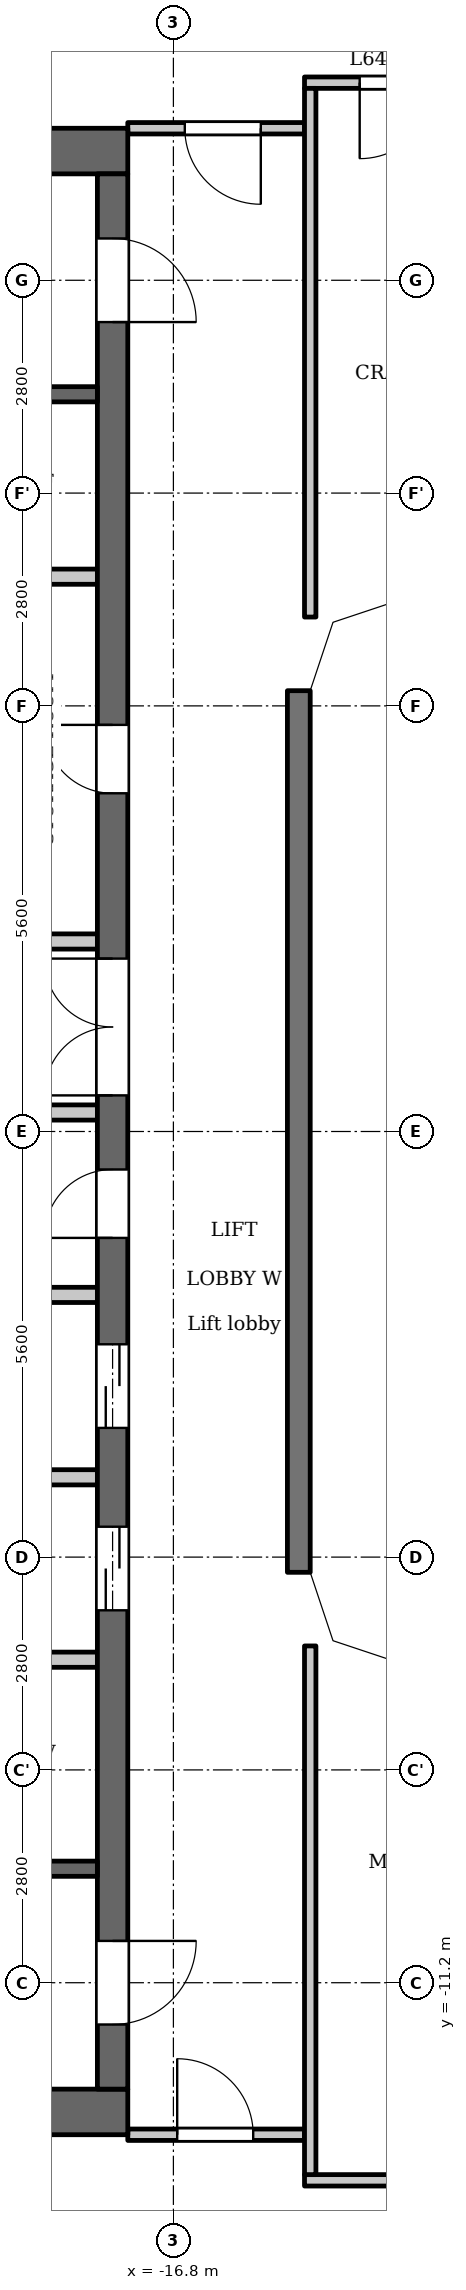
"""IFC4 building model, lengths in metres.
Left out: names, types, materials, properties, quantities, classifications, styles, units other than length and angle.
Written with IfcOpenShell. Run it as: python <this file> out.ifc"""

import sys

from ifc_helpers import new_model, si_unit, direction, frame, frame_2d, origin, place, context, subcontext, project, spatial, polyline, rectangle, outline, extrude, element, fill, save


model = new_model("IFC4")
c1 = context("Model", 3, precision=1e-05, world=origin(), true_north=direction((0.0, 1.0)))
c2 = subcontext(c1, "Body", "Model", "MODEL_VIEW")
j1 = project(units=[si_unit("LENGTHUNIT", "METRE"), si_unit("PLANEANGLEUNIT", "RADIAN")], contexts=[c1])
p1 = place(None, origin())
s1 = spatial("IfcSite", under=j1, at=p1, CompositionType="ELEMENT")
p2 = place(p1, origin())
s2 = spatial("IfcBuilding", under=s1, at=p2, CompositionType="ELEMENT")
p3 = place(p2, frame((0.0, 0.0, 248.7)))
s3 = spatial("IfcBuildingStorey", under=s2, at=p3, CompositionType="ELEMENT", Elevation=248.7)
p4 = place(p3, frame((-15.15, -5.8, 0.0), z_axis=(0.0, 0.0, 1.0), x_axis=(0.0, 1.0, 0.0)))
e1 = element("IfcWall", 1, at=p4, inside=s3, PredefinedType="SOLIDWALL", context=c2, shape_type="SweptSolid", body=[
    extrude(rectangle(XDim=11.6, YDim=0.3, at=frame_2d((5.8, 0.0))), origin(), (0.0, 0.0, 1.0), 3.2),
])
for number, where, z_axis, x_axis in (
    (2, (-17.4, 12.9, 0.0), (0.0, 0.0, 1.0), (-1.0, 0.0, 0.0)),
    (3, (-17.4, -12.9, 0.0), (0.0, 0.0, 1.0), (-1.0, 0.0, 0.0)),
):
    element("IfcWall", number, at=place(p3, frame(where, z_axis=z_axis, x_axis=x_axis)), inside=s3, PredefinedType="SHEAR", context=c2, shape_type="SweptSolid", body=[
        extrude(rectangle(XDim=7.32, YDim=0.6, at=frame_2d((3.66, 0.0))), origin(), (0.0, 0.0, 1.0), 3.2),
    ])
p5 = place(p3, frame((-17.6, -12.6, 0.0), z_axis=(0.0, 0.0, 1.0), x_axis=(0.0, 1.0, 0.0)))
e4 = element("IfcWall", 4, at=p5, inside=s3, PredefinedType="SHEAR", context=c2, shape_type="SweptSolid", body=[
    extrude(rectangle(XDim=25.2, YDim=0.4, at=frame_2d((12.6, 0.0))), origin(), (0.0, 0.0, 1.0), 3.2),
])
p6 = place(p5, frame((6.3, 0.0, 0.0)))
e5 = element("IfcOpeningElement", 5, at=p6, cuts=e4, PredefinedType="OPENING", context=c2, shape_type="SweptSolid", body=[
    extrude(rectangle(XDim=1.1, YDim=2.1, at=frame_2d((0.55, 1.05))), frame((0.0, 0.21, 0.0), z_axis=(0.0, -1.0, 0.0), x_axis=(1.0, 0.0, 0.0)), (0.0, 0.0, 1.0), 0.42),
])
p7 = place(p5, frame((8.7, 0.0, 0.0)))
e6 = element("IfcOpeningElement", 6, at=p7, cuts=e4, PredefinedType="OPENING", context=c2, shape_type="SweptSolid", body=[
    extrude(rectangle(XDim=1.1, YDim=2.1, at=frame_2d((0.55, 1.05))), frame((0.0, 0.21, 0.0), z_axis=(0.0, -1.0, 0.0), x_axis=(1.0, 0.0, 0.0)), (0.0, 0.0, 1.0), 0.42),
])
p8 = place(p5, frame((11.2, 0.0, 0.0)))
e7 = element("IfcOpeningElement", 7, at=p8, cuts=e4, PredefinedType="OPENING", context=c2, shape_type="SweptSolid", body=[
    extrude(rectangle(XDim=0.9, YDim=2.1, at=frame_2d((0.45, 1.05))), frame((0.0, 0.21, 0.0), z_axis=(0.0, -1.0, 0.0), x_axis=(1.0, 0.0, 0.0)), (0.0, 0.0, 1.0), 0.42),
])
p9 = place(p5, frame((17.05, 0.0, 0.0)))
e8 = element("IfcOpeningElement", 8, at=p9, cuts=e4, PredefinedType="OPENING", context=c2, shape_type="SweptSolid", body=[
    extrude(rectangle(XDim=0.9, YDim=2.1, at=frame_2d((0.45, 1.05))), frame((0.0, 0.21, 0.0), z_axis=(0.0, -1.0, 0.0), x_axis=(1.0, 0.0, 0.0)), (0.0, 0.0, 1.0), 0.42),
])
p10 = place(p5, frame((23.25, 0.0, 0.0)))
e9 = element("IfcOpeningElement", 9, at=p10, cuts=e4, PredefinedType="OPENING", context=c2, shape_type="SweptSolid", body=[
    extrude(rectangle(XDim=1.1, YDim=2.1, at=frame_2d((0.55, 1.05))), frame((0.0, 0.21, 0.0), z_axis=(0.0, -1.0, 0.0), x_axis=(1.0, 0.0, 0.0)), (0.0, 0.0, 1.0), 0.42),
])
p11 = place(p5, frame((0.85, 0.0, 0.0)))
e10 = element("IfcOpeningElement", 10, at=p11, cuts=e4, PredefinedType="OPENING", context=c2, shape_type="SweptSolid", body=[
    extrude(rectangle(XDim=1.1, YDim=2.1, at=frame_2d((0.55, 1.05))), frame((0.0, 0.21, 0.0), z_axis=(0.0, -1.0, 0.0), x_axis=(1.0, 0.0, 0.0)), (0.0, 0.0, 1.0), 0.42),
])
p12 = place(p5, frame((13.075, 0.0, 0.0)))
e11 = element("IfcOpeningElement", 11, at=p12, cuts=e4, PredefinedType="OPENING", context=c2, shape_type="SweptSolid", body=[
    extrude(rectangle(XDim=1.8, YDim=2.1, at=frame_2d((0.9, 1.05))), frame((0.0, 0.21, 0.0), z_axis=(0.0, -1.0, 0.0), x_axis=(1.0, 0.0, 0.0)), (0.0, 0.0, 1.0), 0.42),
])
p13 = place(p3, frame((-17.8, -9.7, 0.0), z_axis=(0.0, 0.0, 1.0), x_axis=(-1.0, 0.0, 0.0)))
e12 = element("IfcWall", 12, at=p13, inside=s3, PredefinedType="SHEAR", context=c2, shape_type="SweptSolid", body=[
    extrude(rectangle(XDim=5.8, YDim=0.2, at=frame_2d((2.9, 0.0))), origin(), (0.0, 0.0, 1.0), 3.2),
])
p14 = place(p13, frame((0.85, 0.0, 0.0)))
e13 = element("IfcOpeningElement", 13, at=p14, cuts=e12, PredefinedType="OPENING", context=c2, shape_type="SweptSolid", body=[
    extrude(rectangle(XDim=1.1, YDim=2.1, at=frame_2d((0.55, 1.05))), frame((0.0, 0.11, 0.0), z_axis=(0.0, -1.0, 0.0), x_axis=(1.0, 0.0, 0.0)), (0.0, 0.0, 1.0), 0.22),
])
p15 = place(p13, frame((3.75, 0.0, 0.0)))
e14 = element("IfcOpeningElement", 14, at=p15, cuts=e12, PredefinedType="OPENING", context=c2, shape_type="SweptSolid", body=[
    extrude(rectangle(XDim=1.1, YDim=2.1, at=frame_2d((0.55, 1.05))), frame((0.0, 0.11, 0.0), z_axis=(0.0, -1.0, 0.0), x_axis=(1.0, 0.0, 0.0)), (0.0, 0.0, 1.0), 0.22),
])
for number, where, z_axis, x_axis in (
    (15, (-17.8, -6.95, 0.0), (0.0, 0.0, 1.0), (-1.0, 0.0, 0.0)),
    (16, (-17.8, -4.55, 0.0), (0.0, 0.0, 1.0), (-1.0, 0.0, 0.0)),
    (17, (-17.8, -2.15, 0.0), (0.0, 0.0, 1.0), (-1.0, 0.0, 0.0)),
):
    element("IfcWall", number, at=place(p3, frame(where, z_axis=z_axis, x_axis=x_axis)), inside=s3, PredefinedType="PARTITIONING", context=c2, shape_type="SweptSolid", body=[
        extrude(rectangle(XDim=2.8, YDim=0.2, at=frame_2d((1.4, 0.0))), origin(), (0.0, 0.0, 1.0), 3.2),
    ])
p16 = place(p3, frame((-17.8, 0.25, 0.0), z_axis=(0.0, 0.0, 1.0), x_axis=(-1.0, 0.0, 0.0)))
e18 = element("IfcWall", 18, at=p16, inside=s3, PredefinedType="PARTITIONING", context=c2, shape_type="SweptSolid", body=[
    extrude(rectangle(XDim=3.0, YDim=0.2, at=frame_2d((1.5, 0.0))), origin(), (0.0, 0.0, 1.0), 3.2),
])
p17 = place(p3, frame((-17.8, 2.5, 0.0), z_axis=(0.0, 0.0, 1.0), x_axis=(-1.0, 0.0, 0.0)))
e19 = element("IfcWall", 19, at=p17, inside=s3, PredefinedType="PARTITIONING", context=c2, shape_type="SweptSolid", body=[
    extrude(rectangle(XDim=3.0, YDim=0.2, at=frame_2d((1.5, 0.0))), origin(), (0.0, 0.0, 1.0), 3.2),
])
p18 = place(p17, frame((1.7, 0.0, 0.0)))
e20 = element("IfcOpeningElement", 20, at=p18, cuts=e19, PredefinedType="OPENING", context=c2, shape_type="SweptSolid", body=[
    extrude(rectangle(XDim=0.9, YDim=2.1, at=frame_2d((0.45, 1.05))), frame((0.0, 0.11, 0.0), z_axis=(0.0, -1.0, 0.0), x_axis=(1.0, 0.0, 0.0)), (0.0, 0.0, 1.0), 0.22),
])
p19 = place(p3, frame((-17.8, 7.3, 0.0), z_axis=(0.0, 0.0, 1.0), x_axis=(-1.0, 0.0, 0.0)))
e21 = element("IfcWall", 21, at=p19, inside=s3, PredefinedType="PARTITIONING", context=c2, shape_type="SweptSolid", body=[
    extrude(rectangle(XDim=2.8, YDim=0.2, at=frame_2d((1.4, 0.0))), origin(), (0.0, 0.0, 1.0), 3.2),
])
p20 = place(p3, frame((-17.8, 9.7, 0.0), z_axis=(0.0, 0.0, 1.0), x_axis=(-1.0, 0.0, 0.0)))
e22 = element("IfcWall", 22, at=p20, inside=s3, PredefinedType="SHEAR", context=c2, shape_type="SweptSolid", body=[
    extrude(rectangle(XDim=5.8, YDim=0.2, at=frame_2d((2.9, 0.0))), origin(), (0.0, 0.0, 1.0), 3.2),
])
p21 = place(p20, frame((0.85, 0.0, 0.0)))
e23 = element("IfcOpeningElement", 23, at=p21, cuts=e22, PredefinedType="OPENING", context=c2, shape_type="SweptSolid", body=[
    extrude(rectangle(XDim=1.1, YDim=2.1, at=frame_2d((0.55, 1.05))), frame((0.0, 0.11, 0.0), z_axis=(0.0, -1.0, 0.0), x_axis=(1.0, 0.0, 0.0)), (0.0, 0.0, 1.0), 0.22),
])
p22 = place(p20, frame((3.75, 0.0, 0.0)))
e24 = element("IfcOpeningElement", 24, at=p22, cuts=e22, PredefinedType="OPENING", context=c2, shape_type="SweptSolid", body=[
    extrude(rectangle(XDim=1.1, YDim=2.1, at=frame_2d((0.55, 1.05))), frame((0.0, 0.11, 0.0), z_axis=(0.0, -1.0, 0.0), x_axis=(1.0, 0.0, 0.0)), (0.0, 0.0, 1.0), 0.22),
])
p23 = place(p3, frame((-15.075, -13.8, 0.0), z_axis=(0.0, 0.0, 1.0), x_axis=(1.0, 0.0, 0.0)))
e25 = element("IfcWall", 25, at=p23, inside=s3, PredefinedType="PARTITIONING", context=c2, shape_type="SweptSolid", body=[
    extrude(rectangle(XDim=30.15, YDim=0.15, at=frame_2d((15.075, 0.0))), origin(), (0.0, 0.0, 1.0), 3.2),
])
p24 = place(p23, frame((2.225, 0.0, 0.0)))
e26 = element("IfcOpeningElement", 26, at=p24, cuts=e25, PredefinedType="OPENING", context=c2, shape_type="SweptSolid", body=[
    extrude(rectangle(XDim=1.0, YDim=2.1, at=frame_2d((0.5, 1.05))), frame((0.0, 0.085, 0.0), z_axis=(0.0, -1.0, 0.0), x_axis=(1.0, 0.0, 0.0)), (0.0, 0.0, 1.0), 0.17),
])
p25 = place(p23, frame((4.575, 0.0, 0.0)))
e27 = element("IfcOpeningElement", 27, at=p25, cuts=e25, PredefinedType="OPENING", context=c2, shape_type="SweptSolid", body=[
    extrude(rectangle(XDim=1.0, YDim=2.1, at=frame_2d((0.5, 1.05))), frame((0.0, 0.085, 0.0), z_axis=(0.0, -1.0, 0.0), x_axis=(1.0, 0.0, 0.0)), (0.0, 0.0, 1.0), 0.17),
])
p26 = place(p23, frame((13.425, 0.0, 0.0)))
e28 = element("IfcOpeningElement", 28, at=p26, cuts=e25, PredefinedType="OPENING", context=c2, shape_type="SweptSolid", body=[
    extrude(rectangle(XDim=1.0, YDim=2.1, at=frame_2d((0.5, 1.05))), frame((0.0, 0.085, 0.0), z_axis=(0.0, -1.0, 0.0), x_axis=(1.0, 0.0, 0.0)), (0.0, 0.0, 1.0), 0.17),
])
p27 = place(p23, frame((15.775, 0.0, 0.0)))
e29 = element("IfcOpeningElement", 29, at=p27, cuts=e25, PredefinedType="OPENING", context=c2, shape_type="SweptSolid", body=[
    extrude(rectangle(XDim=1.0, YDim=2.1, at=frame_2d((0.5, 1.05))), frame((0.0, 0.085, 0.0), z_axis=(0.0, -1.0, 0.0), x_axis=(1.0, 0.0, 0.0)), (0.0, 0.0, 1.0), 0.17),
])
p28 = place(p23, frame((24.625, 0.0, 0.0)))
e30 = element("IfcOpeningElement", 30, at=p28, cuts=e25, PredefinedType="OPENING", context=c2, shape_type="SweptSolid", body=[
    extrude(rectangle(XDim=1.0, YDim=2.1, at=frame_2d((0.5, 1.05))), frame((0.0, 0.085, 0.0), z_axis=(0.0, -1.0, 0.0), x_axis=(1.0, 0.0, 0.0)), (0.0, 0.0, 1.0), 0.17),
])
p29 = place(p23, frame((26.924, 0.0, 0.0)))
e31 = element("IfcOpeningElement", 31, at=p29, cuts=e25, PredefinedType="OPENING", context=c2, shape_type="SweptSolid", body=[
    extrude(rectangle(XDim=1.0, YDim=2.1, at=frame_2d((0.5, 1.05))), frame((0.0, 0.085, 0.0), z_axis=(0.0, -1.0, 0.0), x_axis=(1.0, 0.0, 0.0)), (0.0, 0.0, 1.0), 0.17),
])
p30 = place(p3, frame((-17.4, -13.2, 0.0), z_axis=(0.0, 0.0, 1.0), x_axis=(1.0, 0.0, 0.0)))
e32 = element("IfcWall", 32, at=p30, inside=s3, PredefinedType="PARTITIONING", context=c2, shape_type="SweptSolid", body=[
    extrude(rectangle(XDim=2.325, YDim=0.15, at=frame_2d((1.163, 0.0))), origin(), (0.0, 0.0, 1.0), 3.2),
])
p31 = place(p30, frame((0.65, 0.0, 0.0)))
e33 = element("IfcOpeningElement", 33, at=p31, cuts=e32, PredefinedType="OPENING", context=c2, shape_type="SweptSolid", body=[
    extrude(rectangle(XDim=1.0, YDim=2.1, at=frame_2d((0.5, 1.05))), frame((0.0, 0.085, 0.0), z_axis=(0.0, -1.0, 0.0), x_axis=(1.0, 0.0, 0.0)), (0.0, 0.0, 1.0), 0.17),
])
p32 = place(p3, frame((-17.4, 13.2, 0.0), z_axis=(0.0, 0.0, 1.0), x_axis=(1.0, 0.0, 0.0)))
e34 = element("IfcWall", 34, at=p32, inside=s3, PredefinedType="PARTITIONING", context=c2, shape_type="SweptSolid", body=[
    extrude(rectangle(XDim=2.325, YDim=0.15, at=frame_2d((1.163, 0.0))), origin(), (0.0, 0.0, 1.0), 3.2),
])
p33 = place(p32, frame((0.75, 0.0, 0.0)))
e35 = element("IfcOpeningElement", 35, at=p33, cuts=e34, PredefinedType="OPENING", context=c2, shape_type="SweptSolid", body=[
    extrude(rectangle(XDim=1.0, YDim=2.1, at=frame_2d((0.5, 1.05))), frame((0.0, 0.085, 0.0), z_axis=(0.0, -1.0, 0.0), x_axis=(1.0, 0.0, 0.0)), (0.0, 0.0, 1.0), 0.17),
])
p34 = place(p3, frame((-15.075, 13.8, 0.0), z_axis=(0.0, 0.0, 1.0), x_axis=(1.0, 0.0, 0.0)))
e36 = element("IfcWall", 36, at=p34, inside=s3, PredefinedType="PARTITIONING", context=c2, shape_type="SweptSolid", body=[
    extrude(rectangle(XDim=30.15, YDim=0.15, at=frame_2d((15.075, 0.0))), origin(), (0.0, 0.0, 1.0), 3.2),
])
p35 = place(p34, frame((0.726, 0.0, 0.0)))
e37 = element("IfcOpeningElement", 37, at=p35, cuts=e36, PredefinedType="OPENING", context=c2, shape_type="SweptSolid", body=[
    extrude(rectangle(XDim=1.0, YDim=2.1, at=frame_2d((0.5, 1.05))), frame((0.0, 0.085, 0.0), z_axis=(0.0, -1.0, 0.0), x_axis=(1.0, 0.0, 0.0)), (0.0, 0.0, 1.0), 0.17),
])
p36 = place(p34, frame((7.775, 0.0, 0.0)))
e38 = element("IfcOpeningElement", 38, at=p36, cuts=e36, PredefinedType="OPENING", context=c2, shape_type="SweptSolid", body=[
    extrude(rectangle(XDim=1.0, YDim=2.1, at=frame_2d((0.5, 1.05))), frame((0.0, 0.085, 0.0), z_axis=(0.0, -1.0, 0.0), x_axis=(1.0, 0.0, 0.0)), (0.0, 0.0, 1.0), 0.17),
])
p37 = place(p34, frame((10.125, 0.0, 0.0)))
e39 = element("IfcOpeningElement", 39, at=p37, cuts=e36, PredefinedType="OPENING", context=c2, shape_type="SweptSolid", body=[
    extrude(rectangle(XDim=1.0, YDim=2.1, at=frame_2d((0.5, 1.05))), frame((0.0, 0.085, 0.0), z_axis=(0.0, -1.0, 0.0), x_axis=(1.0, 0.0, 0.0)), (0.0, 0.0, 1.0), 0.17),
])
p38 = place(p34, frame((18.975, 0.0, 0.0)))
e40 = element("IfcOpeningElement", 40, at=p38, cuts=e36, PredefinedType="OPENING", context=c2, shape_type="SweptSolid", body=[
    extrude(rectangle(XDim=1.0, YDim=2.1, at=frame_2d((0.5, 1.05))), frame((0.0, 0.085, 0.0), z_axis=(0.0, -1.0, 0.0), x_axis=(1.0, 0.0, 0.0)), (0.0, 0.0, 1.0), 0.17),
])
p39 = place(p34, frame((21.325, 0.0, 0.0)))
e41 = element("IfcOpeningElement", 41, at=p39, cuts=e36, PredefinedType="OPENING", context=c2, shape_type="SweptSolid", body=[
    extrude(rectangle(XDim=1.0, YDim=2.1, at=frame_2d((0.5, 1.05))), frame((0.0, 0.085, 0.0), z_axis=(0.0, -1.0, 0.0), x_axis=(1.0, 0.0, 0.0)), (0.0, 0.0, 1.0), 0.17),
])
p40 = place(p34, frame((28.425, 0.0, 0.0)))
e42 = element("IfcOpeningElement", 42, at=p40, cuts=e36, PredefinedType="OPENING", context=c2, shape_type="SweptSolid", body=[
    extrude(rectangle(XDim=1.0, YDim=2.1, at=frame_2d((0.5, 1.05))), frame((0.0, 0.085, 0.0), z_axis=(0.0, -1.0, 0.0), x_axis=(1.0, 0.0, 0.0)), (0.0, 0.0, 1.0), 0.17),
])
for number, where, z_axis, x_axis in (
    (43, (-15.0, -13.725, 0.0), (0.0, 0.0, 1.0), (0.0, 1.0, 0.0)),
    (44, (-15.0, 6.769, 0.0), (0.0, 0.0, 1.0), (0.0, 1.0, 0.0)),
):
    element("IfcWall", number, at=place(p3, frame(where, z_axis=z_axis, x_axis=x_axis)), inside=s3, PredefinedType="PARTITIONING", context=c2, shape_type="SweptSolid", body=[
        extrude(rectangle(XDim=6.956, YDim=0.15, at=frame_2d((3.478, 0.0))), origin(), (0.0, 0.0, 1.0), 3.2),
    ])
p41 = place(p3, origin())
e45 = element("IfcWall", 45, at=p41, inside=s3, PredefinedType="SOLIDWALL", context=c2, shape_type="SweptSolid", body=[
    extrude(outline(polyline([(-13.849, 7.3), (-14.937, 6.937), (-15.3, 5.849), (-15.3, 5.8), (-15.0, 5.8), (-14.7, 6.7), (-13.8, 7.0), (-13.8, 7.3), (-13.849, 7.3)])), origin(), (0.0, 0.0, 1.0), 3.2),
])
e46 = element("IfcWall", 46, at=p41, inside=s3, PredefinedType="SOLIDWALL", context=c2, shape_type="SweptSolid", body=[
    extrude(outline(polyline([(-14.937, -6.937), (-13.849, -7.3), (-13.8, -7.3), (-13.8, -7.0), (-14.7, -6.7), (-15.0, -5.8), (-15.3, -5.8), (-15.3, -5.849), (-14.937, -6.937)])), origin(), (0.0, 0.0, 1.0), 3.2),
])
p42 = place(p6, origin())
e47 = element("IfcDoor", 47, at=p42, inside=s3, OperationType="DOUBLE_DOOR_SLIDING", PredefinedType="DOOR", context=c2, shape_type="SweptSolid", body=[
    extrude(rectangle(XDim=1.1, YDim=2.1, at=frame_2d((0.55, 1.05))), frame((0.0, 0.025, 0.0), z_axis=(0.0, -1.0, 0.0), x_axis=(1.0, 0.0, 0.0)), (0.0, 0.0, 1.0), 0.05),
])
fill(e5, e47)
p43 = place(p7, origin())
e48 = element("IfcDoor", 48, at=p43, inside=s3, OperationType="DOUBLE_DOOR_SLIDING", PredefinedType="DOOR", context=c2, shape_type="SweptSolid", body=[
    extrude(rectangle(XDim=1.1, YDim=2.1, at=frame_2d((0.55, 1.05))), frame((0.0, 0.025, 0.0), z_axis=(0.0, -1.0, 0.0), x_axis=(1.0, 0.0, 0.0)), (0.0, 0.0, 1.0), 0.05),
])
fill(e6, e48)
p44 = place(p8, origin())
e49 = element("IfcDoor", 49, at=p44, inside=s3, OperationType="SINGLE_SWING_RIGHT", PredefinedType="DOOR", context=c2, shape_type="SweptSolid", body=[
    extrude(rectangle(XDim=0.9, YDim=2.1, at=frame_2d((0.45, 1.05))), frame((0.0, 0.025, 0.0), z_axis=(0.0, -1.0, 0.0), x_axis=(1.0, 0.0, 0.0)), (0.0, 0.0, 1.0), 0.05),
])
fill(e7, e49)
p45 = place(p9, origin())
e50 = element("IfcDoor", 50, at=p45, inside=s3, OperationType="SINGLE_SWING_LEFT", PredefinedType="DOOR", context=c2, shape_type="SweptSolid", body=[
    extrude(rectangle(XDim=0.9, YDim=2.1, at=frame_2d((0.45, 1.05))), frame((0.0, 0.025, 0.0), z_axis=(0.0, -1.0, 0.0), x_axis=(1.0, 0.0, 0.0)), (0.0, 0.0, 1.0), 0.05),
])
fill(e8, e50)
p46 = place(p10, origin())
e51 = element("IfcDoor", 51, at=p46, inside=s3, OperationType="SINGLE_SWING_LEFT", PredefinedType="DOOR", context=c2, shape_type="SweptSolid", body=[
    extrude(rectangle(XDim=1.1, YDim=2.1, at=frame_2d((0.55, 1.05))), frame((0.0, 0.025, 0.0), z_axis=(0.0, -1.0, 0.0), x_axis=(1.0, 0.0, 0.0)), (0.0, 0.0, 1.0), 0.05),
])
fill(e9, e51)
p47 = place(p11, origin())
e52 = element("IfcDoor", 52, at=p47, inside=s3, OperationType="SINGLE_SWING_RIGHT", PredefinedType="DOOR", context=c2, shape_type="SweptSolid", body=[
    extrude(rectangle(XDim=1.1, YDim=2.1, at=frame_2d((0.55, 1.05))), frame((0.0, 0.025, 0.0), z_axis=(0.0, -1.0, 0.0), x_axis=(1.0, 0.0, 0.0)), (0.0, 0.0, 1.0), 0.05),
])
fill(e10, e52)
p48 = place(p12, origin())
e53 = element("IfcDoor", 53, at=p48, inside=s3, OperationType="DOUBLE_DOOR_SINGLE_SWING", PredefinedType="DOOR", context=c2, shape_type="SweptSolid", body=[
    extrude(rectangle(XDim=1.8, YDim=2.1, at=frame_2d((0.9, 1.05))), frame((0.0, 0.025, 0.0), z_axis=(0.0, -1.0, 0.0), x_axis=(1.0, 0.0, 0.0)), (0.0, 0.0, 1.0), 0.05),
])
fill(e11, e53)
p49 = place(p33, origin())
e54 = element("IfcDoor", 54, at=p49, inside=s3, OperationType="SINGLE_SWING_RIGHT", PredefinedType="DOOR", context=c2, shape_type="SweptSolid", body=[
    extrude(rectangle(XDim=1.0, YDim=2.1, at=frame_2d((0.5, 1.05))), frame((0.0, 0.025, 0.0), z_axis=(0.0, -1.0, 0.0), x_axis=(1.0, 0.0, 0.0)), (0.0, 0.0, 1.0), 0.05),
])
fill(e35, e54)
p50 = place(p31, origin())
e55 = element("IfcDoor", 55, at=p50, inside=s3, OperationType="SINGLE_SWING_RIGHT", PredefinedType="DOOR", context=c2, shape_type="SweptSolid", body=[
    extrude(rectangle(XDim=1.0, YDim=2.1, at=frame_2d((0.5, 1.05))), frame((0.0, 0.025, 0.0), z_axis=(0.0, -1.0, 0.0), x_axis=(1.0, 0.0, 0.0)), (0.0, 0.0, 1.0), 0.05),
])
fill(e33, e55)
p51 = place(p35, origin())
e56 = element("IfcDoor", 56, at=p51, inside=s3, OperationType="SINGLE_SWING_LEFT", PredefinedType="DOOR", context=c2, shape_type="SweptSolid", body=[
    extrude(rectangle(XDim=1.0, YDim=2.1, at=frame_2d((0.5, 1.05))), frame((0.0, 0.025, 0.0), z_axis=(0.0, -1.0, 0.0), x_axis=(1.0, 0.0, 0.0)), (0.0, 0.0, 1.0), 0.05),
])
fill(e37, e56)
save(model, sys.argv[1])
